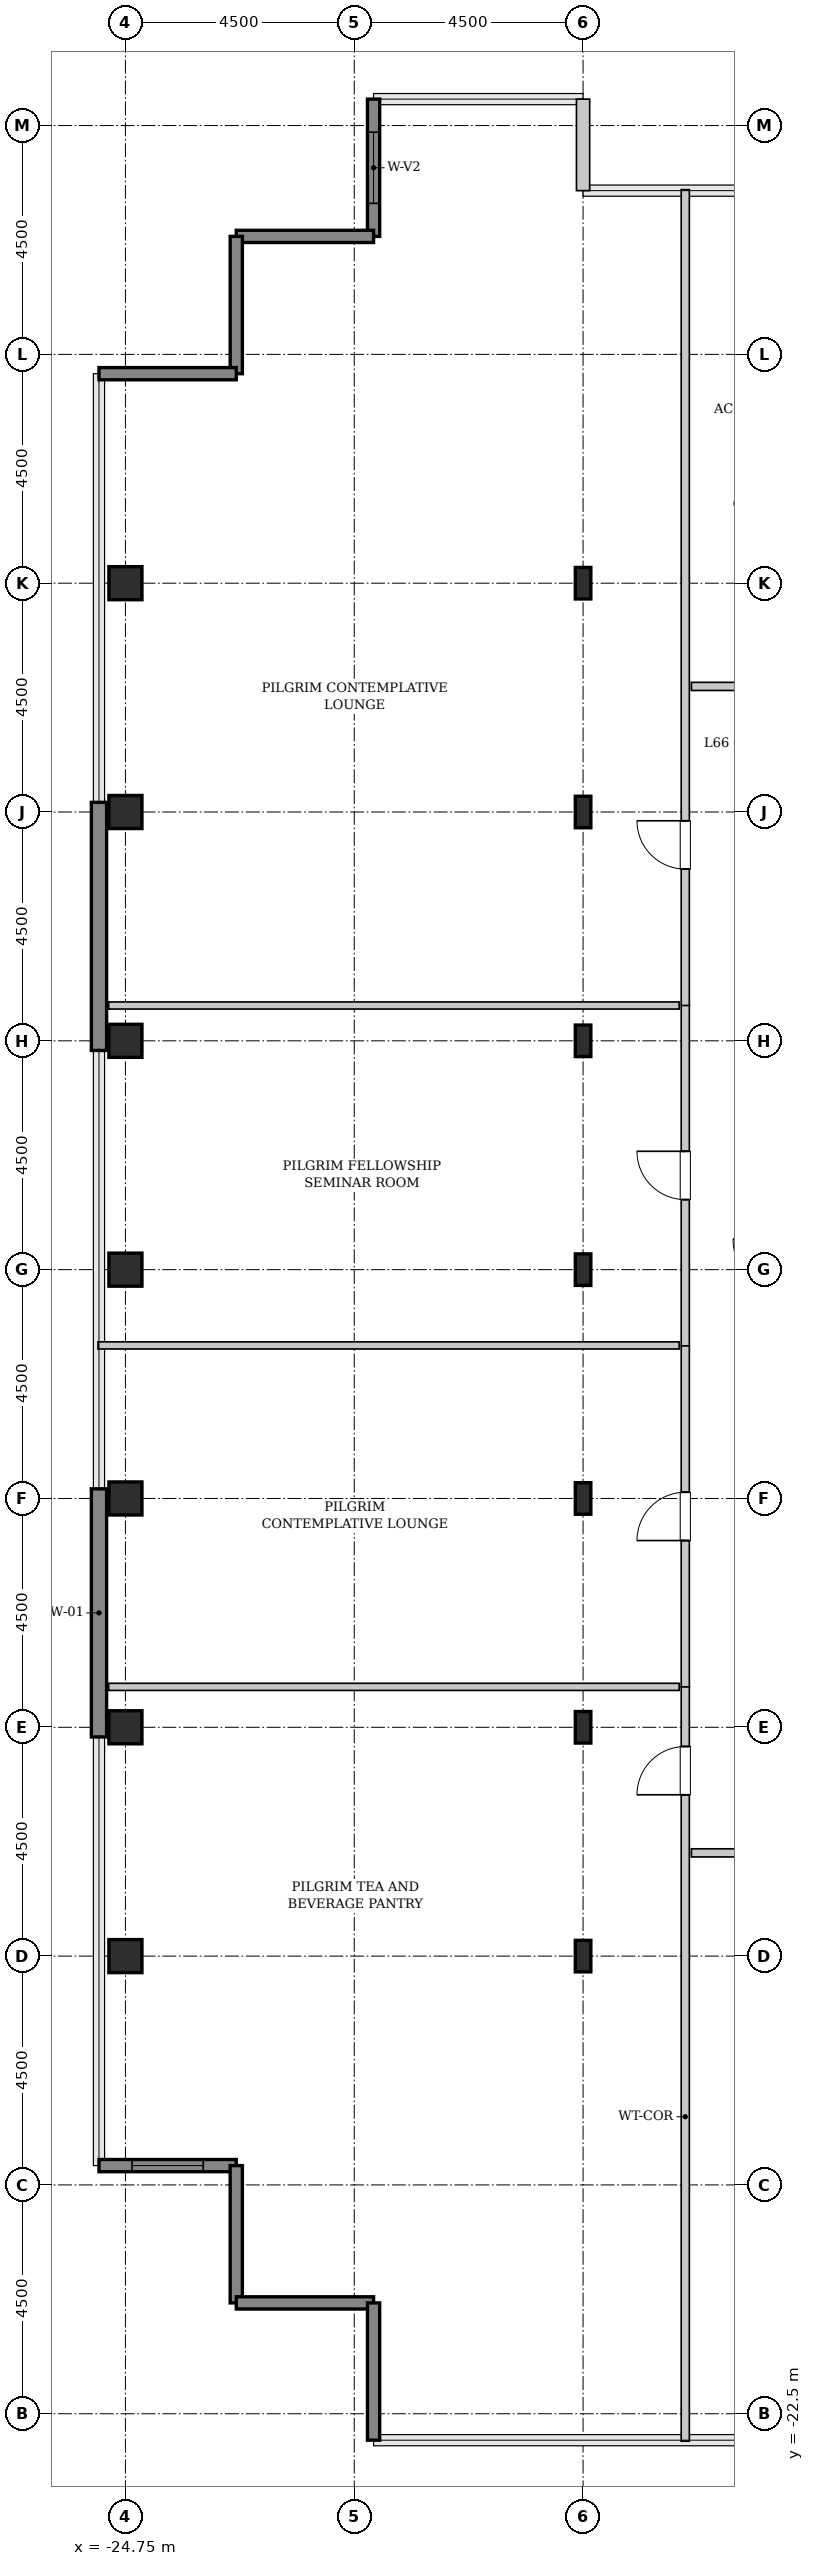
"""IFC4 building model, lengths in metres.
Left out: names, types, materials, properties, quantities, classifications, styles, units other than length and angle.
Written with IfcOpenShell. Run it as: python <this file> out.ifc"""

import sys

from ifc_helpers import new_model, si_unit, direction, frame, frame_2d, origin, origin_2d, place, context, subcontext, project, spatial, rectangle, hollow_rectangle, i_section, extrude, source, transform, mapped, element, fill, save


model = new_model("IFC4")
c1 = context("Model", 3, precision=1e-05, world=origin(), true_north=direction((0.0, 1.0)))
c2 = subcontext(c1, "Body", "Model", "MODEL_VIEW")
j1 = project(units=[si_unit("LENGTHUNIT", "METRE"), si_unit("PLANEANGLEUNIT", "RADIAN")], contexts=[c1])
p1 = place(None, origin())
s1 = spatial("IfcSite", under=j1, at=p1, CompositionType="ELEMENT")
p2 = place(p1, origin())
s2 = spatial("IfcBuilding", under=s1, at=p2, CompositionType="ELEMENT")
p3 = place(p2, frame((0.0, 0.0, 264.6)))
s3 = spatial("IfcBuildingStorey", under=s2, at=p3, CompositionType="ELEMENT", Elevation=264.6)
m1 = source(origin(), c2, "Body", "SweptSolid", [
    extrude(hollow_rectangle(XDim=0.65, YDim=0.65, WallThickness=0.032, InnerFilletRadius=0.032, OuterFilletRadius=0.064, at=origin_2d()), origin(), (0.0, 0.0, 1.0), 3.8),
])
for number, where, z_axis, x_axis in (
    (1, (-24.75, -13.5, 0.0), (0.0, 0.0, 1.0), (1.0, 0.0, 0.0)),
    (2, (-24.75, -9.0, 0.0), (0.0, 0.0, 1.0), (1.0, 0.0, 0.0)),
    (3, (-24.75, -4.5, 0.0), (0.0, 0.0, 1.0), (1.0, 0.0, 0.0)),
    (4, (-24.75, 0.0, 0.0), (0.0, 0.0, 1.0), (1.0, 0.0, 0.0)),
    (5, (-24.75, 4.5, 0.0), (0.0, 0.0, 1.0), (1.0, 0.0, 0.0)),
    (6, (-24.75, 9.0, 0.0), (0.0, 0.0, 1.0), (1.0, 0.0, 0.0)),
    (7, (-24.75, 13.5, 0.0), (0.0, 0.0, 1.0), (1.0, 0.0, 0.0)),
):
    element("IfcColumn", number, at=place(p3, frame(where, z_axis=z_axis, x_axis=x_axis)), inside=s3, PredefinedType="COLUMN", context=c2, shape_type="MappedRepresentation", body=[
        mapped(m1, transform((0.0, 0.0, 0.0), x_axis=(1.0, 0.0, 0.0), y_axis=(0.0, 1.0, 0.0), z_axis=(0.0, 0.0, 1.0), scale=1.0)),
    ])
m2 = source(origin(), c2, "Body", "SweptSolid", [
    extrude(i_section(OverallWidth=0.305, OverallDepth=0.62, WebThickness=0.021, FlangeThickness=0.04, FilletRadius=0.027, at=origin_2d()), origin(), (0.0, 0.0, 1.0), 3.8),
])
for number, where, z_axis, x_axis in (
    (8, (-15.75, -13.5, 0.0), (0.0, 0.0, 1.0), (1.0, 0.0, 0.0)),
    (9, (-15.75, -9.0, 0.0), (0.0, 0.0, 1.0), (1.0, 0.0, 0.0)),
    (10, (-15.75, -4.5, 0.0), (0.0, 0.0, 1.0), (1.0, 0.0, 0.0)),
    (11, (-15.75, 0.0, 0.0), (0.0, 0.0, 1.0), (1.0, 0.0, 0.0)),
    (12, (-15.75, 4.5, 0.0), (0.0, 0.0, 1.0), (1.0, 0.0, 0.0)),
    (13, (-15.75, 9.0, 0.0), (0.0, 0.0, 1.0), (1.0, 0.0, 0.0)),
    (14, (-15.75, 13.5, 0.0), (0.0, 0.0, 1.0), (1.0, 0.0, 0.0)),
):
    element("IfcColumn", number, at=place(p3, frame(where, z_axis=z_axis, x_axis=x_axis)), inside=s3, PredefinedType="COLUMN", context=c2, shape_type="MappedRepresentation", body=[
        mapped(m2, transform((0.0, 0.0, 0.0), x_axis=(1.0, 0.0, 0.0), y_axis=(0.0, 1.0, 0.0), z_axis=(0.0, 0.0, 1.0), scale=1.0)),
    ])
m3 = source(origin(), c2, "Body", "SweptSolid", [
    extrude(rectangle(XDim=4.88, YDim=0.3, at=frame_2d((2.44, 0.0))), origin(), (0.0, 0.0, 1.0), 3.55),
])
for number, where, z_axis, x_axis in (
    (15, (-25.27, -9.19, 0.0), (0.0, 0.0, 1.0), (0.0, 1.0, 0.0)),
    (16, (-25.27, 4.31, 0.0), (0.0, 0.0, 1.0), (0.0, 1.0, 0.0)),
):
    element("IfcWall", number, at=place(p3, frame(where, z_axis=z_axis, x_axis=x_axis)), inside=s3, PredefinedType="SHEAR", context=c2, shape_type="MappedRepresentation", body=[
        mapped(m3, transform((0.0, 0.0, 0.0), x_axis=(1.0, 0.0, 0.0), y_axis=(0.0, 1.0, 0.0), z_axis=(0.0, 0.0, 1.0), scale=1.0)),
    ])
m4 = source(origin(), c2, "Body", "SweptSolid", [
    extrude(rectangle(XDim=1.8, YDim=0.26, at=frame_2d((0.9, 0.0))), origin(), (0.0, 0.0, 1.0), 3.55),
])
p4 = place(p3, frame((-15.75, 21.22, 0.0), z_axis=(0.0, 0.0, 1.0), x_axis=(0.0, 1.0, 0.0)))
e17 = element("IfcWall", 17, at=p4, inside=s3, PredefinedType="SOLIDWALL", context=c2, shape_type="MappedRepresentation", body=[
    mapped(m4, transform((0.0, 0.0, 0.0), x_axis=(1.0, 0.0, 0.0), y_axis=(0.0, 1.0, 0.0), z_axis=(0.0, 0.0, 1.0), scale=1.0)),
])
m5 = source(origin(), c2, "Body", "SweptSolid", [
    extrude(rectangle(XDim=2.7, YDim=0.24, at=frame_2d((1.35, 0.0))), origin(), (0.0, 0.0, 1.0), 3.55),
])
p5 = place(p3, frame((-19.87, 23.02, 0.0), z_axis=(0.0, 0.0, 1.0), x_axis=(0.0, -1.0, 0.0)))
e18 = element("IfcWall", 18, at=p5, inside=s3, PredefinedType="SHEAR", context=c2, shape_type="MappedRepresentation", body=[
    mapped(m5, transform((0.0, 0.0, 0.0), x_axis=(1.0, 0.0, 0.0), y_axis=(0.0, 1.0, 0.0), z_axis=(0.0, 0.0, 1.0), scale=1.0)),
])
p6 = place(p5, frame((0.65, 0.0, 0.85)))
e19 = element("IfcOpeningElement", 19, at=p6, cuts=e18, PredefinedType="OPENING", context=c2, shape_type="SweptSolid", body=[
    extrude(rectangle(XDim=1.4, YDim=1.8, at=frame_2d((0.7, 0.9))), frame((0.0, 0.13, 0.0), z_axis=(0.0, -1.0, 0.0), x_axis=(1.0, 0.0, 0.0)), (0.0, 0.0, 1.0), 0.26),
])
for number, where, z_axis, x_axis in (
    (20, (-19.87, 20.32, 0.0), (0.0, 0.0, 1.0), (-1.0, 0.0, 0.0)),
    (21, (-22.57, 20.32, 0.0), (0.0, 0.0, 1.0), (0.0, -1.0, 0.0)),
    (22, (-22.57, 17.62, 0.0), (0.0, 0.0, 1.0), (-1.0, 0.0, 0.0)),
):
    element("IfcWall", number, at=place(p3, frame(where, z_axis=z_axis, x_axis=x_axis)), inside=s3, PredefinedType="SHEAR", context=c2, shape_type="MappedRepresentation", body=[
        mapped(m5, transform((0.0, 0.0, 0.0), x_axis=(1.0, 0.0, 0.0), y_axis=(0.0, 1.0, 0.0), z_axis=(0.0, 0.0, 1.0), scale=1.0)),
    ])
p7 = place(p3, frame((-25.27, -17.62, 0.0), z_axis=(0.0, 0.0, 1.0), x_axis=(1.0, 0.0, 0.0)))
e23 = element("IfcWall", 23, at=p7, inside=s3, PredefinedType="SHEAR", context=c2, shape_type="MappedRepresentation", body=[
    mapped(m5, transform((0.0, 0.0, 0.0), x_axis=(1.0, 0.0, 0.0), y_axis=(0.0, 1.0, 0.0), z_axis=(0.0, 0.0, 1.0), scale=1.0)),
])
p8 = place(p7, frame((0.65, 0.0, 0.85)))
e24 = element("IfcOpeningElement", 24, at=p8, cuts=e23, PredefinedType="OPENING", context=c2, shape_type="SweptSolid", body=[
    extrude(rectangle(XDim=1.4, YDim=1.8, at=frame_2d((0.7, 0.9))), frame((0.0, 0.13, 0.0), z_axis=(0.0, -1.0, 0.0), x_axis=(1.0, 0.0, 0.0)), (0.0, 0.0, 1.0), 0.26),
])
for number, where, z_axis, x_axis in (
    (25, (-22.57, -17.62, 0.0), (0.0, 0.0, 1.0), (0.0, -1.0, 0.0)),
    (26, (-22.57, -20.32, 0.0), (0.0, 0.0, 1.0), (1.0, 0.0, 0.0)),
    (27, (-19.87, -20.32, 0.0), (0.0, 0.0, 1.0), (0.0, -1.0, 0.0)),
):
    element("IfcWall", number, at=place(p3, frame(where, z_axis=z_axis, x_axis=x_axis)), inside=s3, PredefinedType="SHEAR", context=c2, shape_type="MappedRepresentation", body=[
        mapped(m5, transform((0.0, 0.0, 0.0), x_axis=(1.0, 0.0, 0.0), y_axis=(0.0, 1.0, 0.0), z_axis=(0.0, 0.0, 1.0), scale=1.0)),
    ])
m6 = source(origin(), c2, "Body", "SweptSolid", [
    extrude(rectangle(XDim=14.845, YDim=0.16, at=frame_2d((7.422, 0.0))), origin(), (0.0, 0.0, 1.0), 3.535),
])
p9 = place(p3, frame((-13.74, -23.04, 0.0), z_axis=(0.0, 0.0, 1.0), x_axis=(0.0, 1.0, 0.0)))
e28 = element("IfcWall", 28, at=p9, inside=s3, PredefinedType="PARTITIONING", context=c2, shape_type="MappedRepresentation", body=[
    mapped(m6, transform((0.0, 0.0, 0.0), x_axis=(1.0, 0.0, 0.0), y_axis=(0.0, 1.0, 0.0), z_axis=(0.0, 0.0, 1.0), scale=1.0)),
])
p10 = place(p9, frame((12.712, 0.0, 0.0)))
e29 = element("IfcOpeningElement", 29, at=p10, cuts=e28, PredefinedType="OPENING", context=c2, shape_type="SweptSolid", body=[
    extrude(rectangle(XDim=0.95, YDim=2.1, at=frame_2d((0.475, 1.05))), frame((0.0, 0.09, 0.0), z_axis=(0.0, -1.0, 0.0), x_axis=(1.0, 0.0, 0.0)), (0.0, 0.0, 1.0), 0.18),
])
m7 = source(origin(), c2, "Body", "SweptSolid", [
    extrude(rectangle(XDim=11.22, YDim=0.14, at=frame_2d((5.61, 0.0))), origin(), (0.0, 0.0, 1.0), 3.535),
])
p11 = place(p3, frame((-25.08, -8.205, 0.0), z_axis=(0.0, 0.0, 1.0), x_axis=(1.0, 0.0, 0.0)))
e30 = element("IfcWall", 30, at=p11, inside=s3, PredefinedType="PARTITIONING", context=c2, shape_type="MappedRepresentation", body=[
    mapped(m7, transform((0.0, 0.0, 0.0), x_axis=(1.0, 0.0, 0.0), y_axis=(0.0, 1.0, 0.0), z_axis=(0.0, 0.0, 1.0), scale=1.0)),
])
m8 = source(origin(), c2, "Body", "SweptSolid", [
    extrude(rectangle(XDim=6.705, YDim=0.16, at=frame_2d((3.353, 0.0))), origin(), (0.0, 0.0, 1.0), 3.535),
])
p12 = place(p3, frame((-13.74, -1.5, 0.0), z_axis=(0.0, 0.0, 1.0), x_axis=(0.0, 1.0, 0.0)))
e31 = element("IfcWall", 31, at=p12, inside=s3, PredefinedType="PARTITIONING", context=c2, shape_type="MappedRepresentation", body=[
    mapped(m8, transform((0.0, 0.0, 0.0), x_axis=(1.0, 0.0, 0.0), y_axis=(0.0, 1.0, 0.0), z_axis=(0.0, 0.0, 1.0), scale=1.0)),
])
p13 = place(p12, frame((2.877, 0.0, 0.0)))
e32 = element("IfcOpeningElement", 32, at=p13, cuts=e31, PredefinedType="OPENING", context=c2, shape_type="SweptSolid", body=[
    extrude(rectangle(XDim=0.95, YDim=2.1, at=frame_2d((0.475, 1.05))), frame((0.0, 0.09, 0.0), z_axis=(0.0, -1.0, 0.0), x_axis=(1.0, 0.0, 0.0)), (0.0, 0.0, 1.0), 0.18),
])
p14 = place(p3, frame((-25.08, 5.195, 0.0), z_axis=(0.0, 0.0, 1.0), x_axis=(1.0, 0.0, 0.0)))
e33 = element("IfcWall", 33, at=p14, inside=s3, PredefinedType="PARTITIONING", context=c2, shape_type="MappedRepresentation", body=[
    mapped(m7, transform((0.0, 0.0, 0.0), x_axis=(1.0, 0.0, 0.0), y_axis=(0.0, 1.0, 0.0), z_axis=(0.0, 0.0, 1.0), scale=1.0)),
])
m9 = source(origin(), c2, "Body", "SweptSolid", [
    extrude(rectangle(XDim=11.43, YDim=0.14, at=frame_2d((5.715, 0.0))), origin(), (0.0, 0.0, 1.0), 3.535),
])
p15 = place(p3, frame((-25.29, -1.49, 0.0), z_axis=(0.0, 0.0, 1.0), x_axis=(1.0, 0.0, 0.0)))
e34 = element("IfcWall", 34, at=p15, inside=s3, PredefinedType="PARTITIONING", context=c2, shape_type="MappedRepresentation", body=[
    mapped(m9, transform((0.0, 0.0, 0.0), x_axis=(1.0, 0.0, 0.0), y_axis=(0.0, 1.0, 0.0), z_axis=(0.0, 0.0, 1.0), scale=1.0)),
])
p16 = place(p3, frame((-13.74, -8.205, 0.0), z_axis=(0.0, 0.0, 1.0), x_axis=(0.0, 1.0, 0.0)))
e35 = element("IfcWall", 35, at=p16, inside=s3, PredefinedType="PARTITIONING", context=c2, shape_type="MappedRepresentation", body=[
    mapped(m8, transform((0.0, 0.0, 0.0), x_axis=(1.0, 0.0, 0.0), y_axis=(0.0, 1.0, 0.0), z_axis=(0.0, 0.0, 1.0), scale=1.0)),
])
p17 = place(p16, frame((2.877, 0.0, 0.0)))
e36 = element("IfcOpeningElement", 36, at=p17, cuts=e35, PredefinedType="OPENING", context=c2, shape_type="SweptSolid", body=[
    extrude(rectangle(XDim=0.95, YDim=2.1, at=frame_2d((0.475, 1.05))), frame((0.0, 0.09, 0.0), z_axis=(0.0, -1.0, 0.0), x_axis=(1.0, 0.0, 0.0)), (0.0, 0.0, 1.0), 0.18),
])
m10 = source(origin(), c2, "Body", "SweptSolid", [
    extrude(rectangle(XDim=16.045, YDim=0.16, at=frame_2d((8.022, 0.0))), origin(), (0.0, 0.0, 1.0), 3.535),
])
p18 = place(p3, frame((-13.74, 5.195, 0.0), z_axis=(0.0, 0.0, 1.0), x_axis=(0.0, 1.0, 0.0)))
e37 = element("IfcWall", 37, at=p18, inside=s3, PredefinedType="PARTITIONING", context=c2, shape_type="MappedRepresentation", body=[
    mapped(m10, transform((0.0, 0.0, 0.0), x_axis=(1.0, 0.0, 0.0), y_axis=(0.0, 1.0, 0.0), z_axis=(0.0, 0.0, 1.0), scale=1.0)),
])
p19 = place(p18, frame((2.683, 0.0, 0.0)))
e38 = element("IfcOpeningElement", 38, at=p19, cuts=e37, PredefinedType="OPENING", context=c2, shape_type="SweptSolid", body=[
    extrude(rectangle(XDim=0.95, YDim=2.1, at=frame_2d((0.475, 1.05))), frame((0.0, 0.09, 0.0), z_axis=(0.0, -1.0, 0.0), x_axis=(1.0, 0.0, 0.0)), (0.0, 0.0, 1.0), 0.18),
])
m11 = source(origin(), c2, "Body", "SweptSolid", [
    extrude(rectangle(XDim=4.125, YDim=0.16, at=frame_2d((2.062, 0.0))), origin(), (0.0, 0.0, 1.0), 3.535),
])
p20 = place(p3, frame((-13.62, 11.47, 0.0), z_axis=(0.0, 0.0, 1.0), x_axis=(1.0, 0.0, 0.0)))
e39 = element("IfcWall", 39, at=p20, inside=s3, PredefinedType="PARTITIONING", context=c2, shape_type="MappedRepresentation", body=[
    mapped(m11, transform((0.0, 0.0, 0.0), x_axis=(1.0, 0.0, 0.0), y_axis=(0.0, 1.0, 0.0), z_axis=(0.0, 0.0, 1.0), scale=1.0)),
])
p21 = place(p20, frame((1.587, 0.0, 0.0)))
e40 = element("IfcOpeningElement", 40, at=p21, cuts=e39, PredefinedType="OPENING", context=c2, shape_type="SweptSolid", body=[
    extrude(rectangle(XDim=0.95, YDim=2.1, at=frame_2d((0.475, 1.05))), frame((0.0, 0.09, 0.0), z_axis=(0.0, -1.0, 0.0), x_axis=(1.0, 0.0, 0.0)), (0.0, 0.0, 1.0), 0.18),
])
m12 = source(origin(), c2, "Body", "SweptSolid", [
    extrude(rectangle(XDim=4.425, YDim=0.16, at=frame_2d((2.212, 0.0))), origin(), (0.0, 0.0, 1.0), 3.535),
])
p22 = place(p3, frame((-13.62, -11.47, 0.0), z_axis=(0.0, 0.0, 1.0), x_axis=(1.0, 0.0, 0.0)))
e41 = element("IfcWall", 41, at=p22, inside=s3, PredefinedType="PARTITIONING", context=c2, shape_type="MappedRepresentation", body=[
    mapped(m12, transform((0.0, 0.0, 0.0), x_axis=(1.0, 0.0, 0.0), y_axis=(0.0, 1.0, 0.0), z_axis=(0.0, 0.0, 1.0), scale=1.0)),
])
p23 = place(p22, frame((1.738, 0.0, 0.0)))
e42 = element("IfcOpeningElement", 42, at=p23, cuts=e41, PredefinedType="OPENING", context=c2, shape_type="SweptSolid", body=[
    extrude(rectangle(XDim=0.95, YDim=2.1, at=frame_2d((0.475, 1.05))), frame((0.0, 0.09, 0.0), z_axis=(0.0, -1.0, 0.0), x_axis=(1.0, 0.0, 0.0)), (0.0, 0.0, 1.0), 0.18),
])
m13 = source(origin(), c2, "Body", "SweptSolid", [
    extrude(rectangle(XDim=1.4, YDim=1.8, at=frame_2d((0.7, 0.9))), frame((0.0, 0.03, 0.0), z_axis=(0.0, -1.0, 0.0), x_axis=(1.0, 0.0, 0.0)), (0.0, 0.0, 1.0), 0.06),
])
p24 = place(p6, origin())
e43 = element("IfcWindow", 43, at=p24, inside=s3, PartitioningType="SINGLE_PANEL", PredefinedType="WINDOW", context=c2, shape_type="MappedRepresentation", body=[
    mapped(m13, transform((0.0, 0.0, 0.0), x_axis=(1.0, 0.0, 0.0), y_axis=(0.0, 1.0, 0.0), z_axis=(0.0, 0.0, 1.0), scale=1.0)),
])
fill(e19, e43)
p25 = place(p8, origin())
e44 = element("IfcWindow", 44, at=p25, inside=s3, PartitioningType="SINGLE_PANEL", PredefinedType="WINDOW", context=c2, shape_type="MappedRepresentation", body=[
    mapped(m13, transform((0.0, 0.0, 0.0), x_axis=(1.0, 0.0, 0.0), y_axis=(0.0, 1.0, 0.0), z_axis=(0.0, 0.0, 1.0), scale=1.0)),
])
fill(e24, e44)
m14 = source(origin(), c2, "Body", "SweptSolid", [
    extrude(rectangle(XDim=0.95, YDim=2.1, at=frame_2d((0.475, 1.05))), frame((0.0, 0.025, 0.0), z_axis=(0.0, -1.0, 0.0), x_axis=(1.0, 0.0, 0.0)), (0.0, 0.0, 1.0), 0.05),
])
p26 = place(p10, origin())
e45 = element("IfcDoor", 45, at=p26, inside=s3, OperationType="SINGLE_SWING_LEFT", PredefinedType="DOOR", context=c2, shape_type="MappedRepresentation", body=[
    mapped(m14, transform((0.0, 0.0, 0.0), x_axis=(1.0, 0.0, 0.0), y_axis=(0.0, 1.0, 0.0), z_axis=(0.0, 0.0, 1.0), scale=1.0)),
])
fill(e29, e45)
p27 = place(p13, origin())
e46 = element("IfcDoor", 46, at=p27, inside=s3, OperationType="SINGLE_SWING_RIGHT", PredefinedType="DOOR", context=c2, shape_type="MappedRepresentation", body=[
    mapped(m14, transform((0.0, 0.0, 0.0), x_axis=(1.0, 0.0, 0.0), y_axis=(0.0, 1.0, 0.0), z_axis=(0.0, 0.0, 1.0), scale=1.0)),
])
fill(e32, e46)
p28 = place(p17, origin())
e47 = element("IfcDoor", 47, at=p28, inside=s3, OperationType="SINGLE_SWING_LEFT", PredefinedType="DOOR", context=c2, shape_type="MappedRepresentation", body=[
    mapped(m14, transform((0.0, 0.0, 0.0), x_axis=(1.0, 0.0, 0.0), y_axis=(0.0, 1.0, 0.0), z_axis=(0.0, 0.0, 1.0), scale=1.0)),
])
fill(e36, e47)
p29 = place(p19, origin())
e48 = element("IfcDoor", 48, at=p29, inside=s3, OperationType="SINGLE_SWING_RIGHT", PredefinedType="DOOR", context=c2, shape_type="MappedRepresentation", body=[
    mapped(m14, transform((0.0, 0.0, 0.0), x_axis=(1.0, 0.0, 0.0), y_axis=(0.0, 1.0, 0.0), z_axis=(0.0, 0.0, 1.0), scale=1.0)),
])
fill(e38, e48)
save(model, sys.argv[1])
